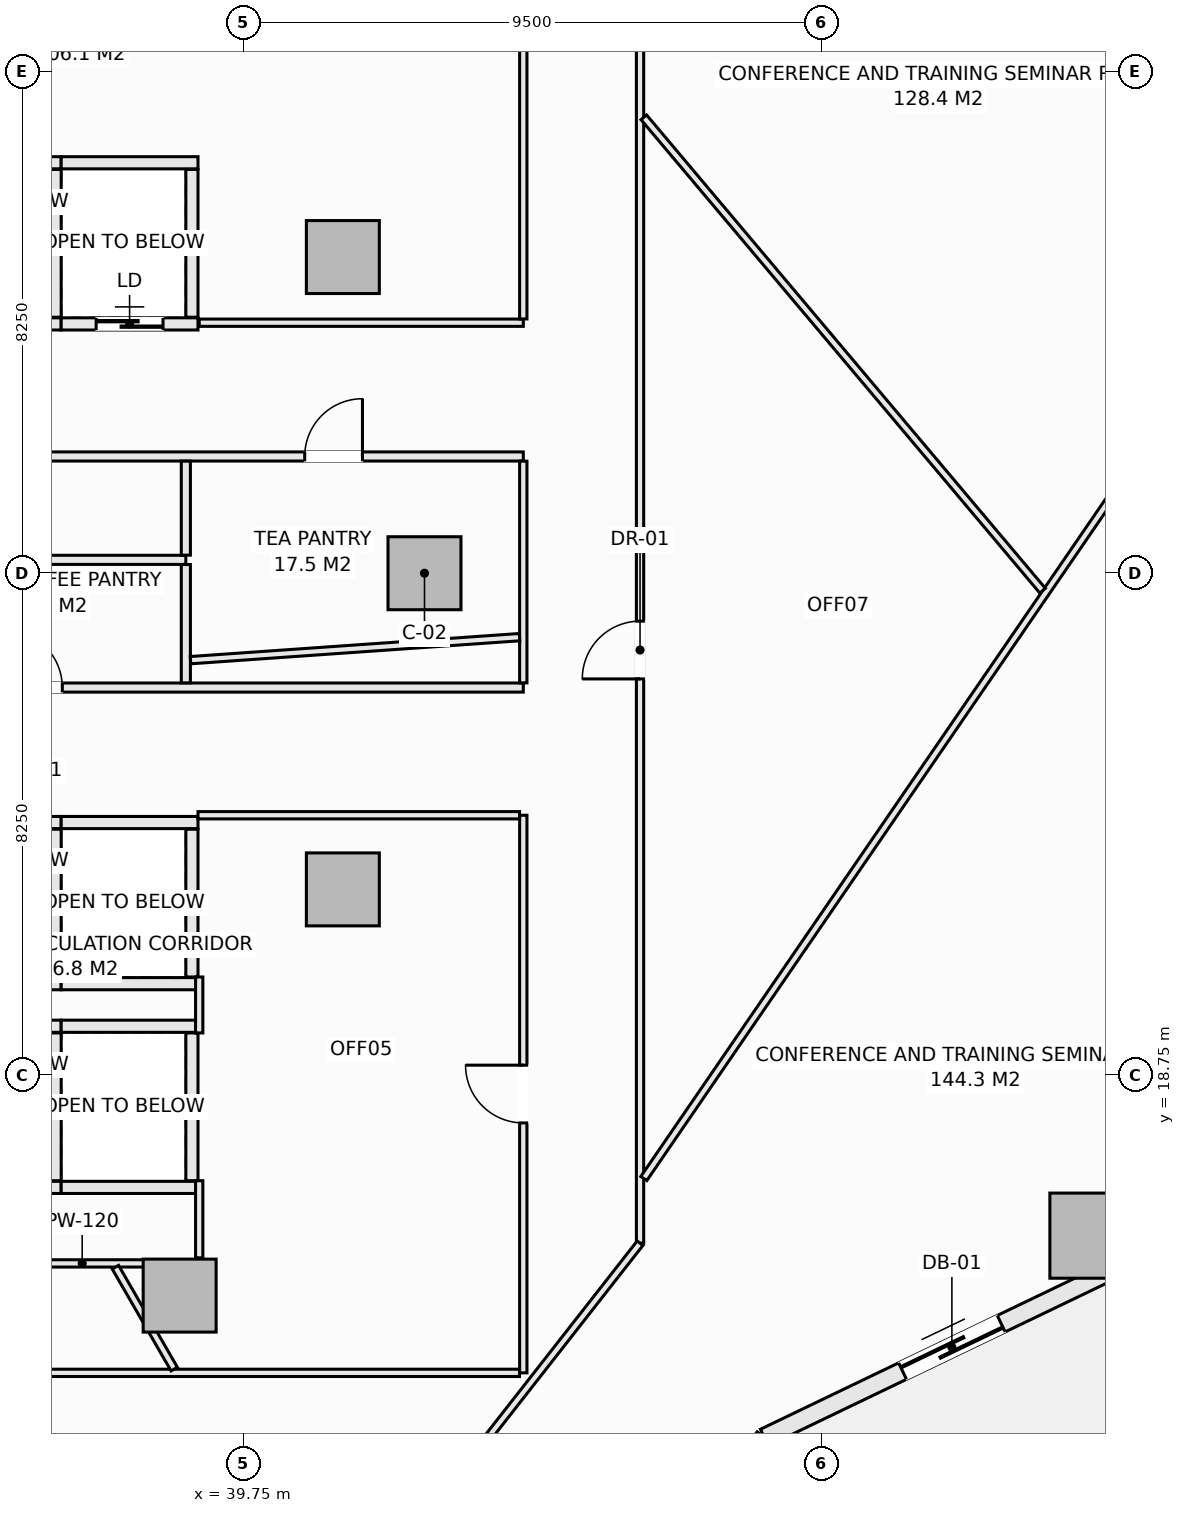
"""IFC4 building model, lengths in metres.
Left out: names, types, materials, properties, quantities, classifications, styles, units other than length and angle.
Written with IfcOpenShell. Run it as: python <this file> out.ifc"""

import sys

from ifc_helpers import new_model, si_unit, direction, frame, frame_2d, origin, origin_2d, place, context, subcontext, project, spatial, rectangle, extrude, element, fill, save


model = new_model("IFC4")
c1 = context("Model", 3, precision=1e-05, world=origin(), true_north=direction((0.0, 1.0)))
c2 = subcontext(c1, "Body", "Model", "MODEL_VIEW")
j1 = project(units=[si_unit("LENGTHUNIT", "METRE"), si_unit("PLANEANGLEUNIT", "RADIAN")], contexts=[c1])
p1 = place(None, origin())
s1 = spatial("IfcSite", under=j1, at=p1, CompositionType="ELEMENT")
p2 = place(p1, origin())
s2 = spatial("IfcBuilding", under=s1, at=p2, CompositionType="ELEMENT")
p3 = place(p2, frame((0.0, 0.0, 38.05)))
s3 = spatial("IfcBuildingStorey", under=s2, at=p3, CompositionType="ELEMENT", Elevation=38.05)
p4 = place(p3, frame((53.71, 16.106, -0.28), z_axis=(0.0, 0.0, 1.0), x_axis=(1.0, 0.0, 0.0)))
e1 = element("IfcColumn", 1, at=p4, inside=s3, PredefinedType="COLUMN", context=c2, shape_type="SweptSolid", body=[
    extrude(rectangle(XDim=1.4, YDim=1.4, at=origin_2d()), origin(), (0.0, 0.0, 1.0), 3.85),
])
for number, where, z_axis, x_axis in (
    (2, (42.725, 27.0, -0.28), (0.0, 0.0, 1.0), (1.0, 0.0, 0.0)),
    (3, (41.382, 32.199, -0.28), (0.0, 0.0, 1.0), (1.0, 0.0, 0.0)),
    (4, (38.698, 15.121, -0.28), (0.0, 0.0, 1.0), (1.0, 0.0, 0.0)),
    (5, (41.382, 21.801, -0.28), (0.0, 0.0, 1.0), (1.0, 0.0, 0.0)),
):
    element("IfcColumn", number, at=place(p3, frame(where, z_axis=z_axis, x_axis=x_axis)), inside=s3, PredefinedType="COLUMN", context=c2, shape_type="SweptSolid", body=[
        extrude(rectangle(XDim=1.2, YDim=1.2, at=origin_2d()), origin(), (0.0, 0.0, 1.0), 3.85),
    ])
p5 = place(p3, frame((44.188, 7.514, 0.0), z_axis=(0.0, 0.0, 1.0), x_axis=(0.616421309777, 0.787416515482, 0.0)))
e6 = element("IfcWall", 6, at=p5, inside=s3, PredefinedType="SOLIDWALL", context=c2, shape_type="SweptSolid", body=[
    extrude(rectangle(XDim=6.696, YDim=0.3, at=frame_2d((3.348, 0.0))), origin(), (0.0, 0.0, 1.0), 3.093),
])
p6 = place(p5, frame((2.148, 0.0, 0.85)))
e7 = element("IfcOpeningElement", 7, at=p6, cuts=e6, PredefinedType="OPENING", context=c2, shape_type="SweptSolid", body=[
    extrude(rectangle(XDim=2.4, YDim=1.9, at=frame_2d((1.2, 0.95))), frame((0.0, 0.16, 0.0), z_axis=(0.0, -1.0, 0.0), x_axis=(1.0, 0.0, 0.0)), (0.0, 0.0, 1.0), 0.32),
])
p7 = place(p3, frame((48.315, 12.787, 0.0), z_axis=(0.0, 0.0, 1.0), x_axis=(0.901360393999, 0.433069786673, 0.0)))
e8 = element("IfcWall", 8, at=p7, inside=s3, PredefinedType="SOLIDWALL", context=c2, shape_type="SweptSolid", body=[
    extrude(rectangle(XDim=6.842, YDim=0.3, at=frame_2d((3.421, 0.0))), origin(), (0.0, 0.0, 1.0), 3.093),
])
p8 = place(p7, frame((2.521, 0.0, 0.0)))
e9 = element("IfcOpeningElement", 9, at=p8, cuts=e8, PredefinedType="OPENING", context=c2, shape_type="SweptSolid", body=[
    extrude(rectangle(XDim=1.8, YDim=2.25, at=frame_2d((0.9, 1.125))), frame((0.0, 0.16, 0.0), z_axis=(0.0, -1.0, 0.0), x_axis=(1.0, 0.0, 0.0)), (0.0, 0.0, 1.0), 0.32),
])
p9 = place(p3, frame((50.959, 10.678, 0.0), z_axis=(0.0, 0.0, 1.0), x_axis=(0.873500119739, 0.48682393205, 0.0)))
e10 = element("IfcWall", 10, at=p9, inside=s3, PredefinedType="PARAPET", context=c2, shape_type="SweptSolid", body=[
    extrude(rectangle(XDim=7.562, YDim=0.22, at=frame_2d((3.781, 0.0))), origin(), (0.0, 0.0, 1.0), 0.52),
])
p10 = place(p3, frame((34.5, 33.75, 0.0), z_axis=(0.0, 0.0, 1.0), x_axis=(1.0, 0.0, 0.0)))
e11 = element("IfcWall", 11, at=p10, inside=s3, PredefinedType="SOLIDWALL", context=c2, shape_type="SweptSolid", body=[
    extrude(rectangle(XDim=2.25, YDim=0.2, at=frame_2d((1.125, 0.0))), origin(), (0.0, 0.0, 1.0), 3.57),
])
p11 = place(p3, frame((34.5, 31.1, 0.0), z_axis=(0.0, 0.0, 1.0), x_axis=(1.0, 0.0, 0.0)))
e12 = element("IfcWall", 12, at=p11, inside=s3, PredefinedType="SOLIDWALL", context=c2, shape_type="SweptSolid", body=[
    extrude(rectangle(XDim=2.25, YDim=0.2, at=frame_2d((1.125, 0.0))), origin(), (0.0, 0.0, 1.0), 3.57),
])
p12 = place(p11, frame((0.575, 0.0, 0.0)))
e13 = element("IfcOpeningElement", 13, at=p12, cuts=e12, PredefinedType="OPENING", context=c2, shape_type="SweptSolid", body=[
    extrude(rectangle(XDim=1.1, YDim=2.2, at=frame_2d((0.55, 1.1))), frame((0.0, 0.11, 0.0), z_axis=(0.0, -1.0, 0.0), x_axis=(1.0, 0.0, 0.0)), (0.0, 0.0, 1.0), 0.22),
])
p13 = place(p3, frame((36.65, 31.21, 0.0), z_axis=(0.0, 0.0, 1.0), x_axis=(0.0, 1.0, 0.0)))
e14 = element("IfcWall", 14, at=p13, inside=s3, PredefinedType="SOLIDWALL", context=c2, shape_type="SweptSolid", body=[
    extrude(rectangle(XDim=2.43, YDim=0.2, at=frame_2d((1.215, 0.0))), origin(), (0.0, 0.0, 1.0), 3.57),
])
p14 = place(p3, frame((36.75, 33.75, 0.0), z_axis=(0.0, 0.0, 1.0), x_axis=(1.0, 0.0, 0.0)))
e15 = element("IfcWall", 15, at=p14, inside=s3, PredefinedType="SOLIDWALL", context=c2, shape_type="SweptSolid", body=[
    extrude(rectangle(XDim=2.25, YDim=0.2, at=frame_2d((1.125, 0.0))), origin(), (0.0, 0.0, 1.0), 3.57),
])
p15 = place(p3, frame((36.75, 31.1, 0.0), z_axis=(0.0, 0.0, 1.0), x_axis=(1.0, 0.0, 0.0)))
e16 = element("IfcWall", 16, at=p15, inside=s3, PredefinedType="SOLIDWALL", context=c2, shape_type="SweptSolid", body=[
    extrude(rectangle(XDim=2.25, YDim=0.2, at=frame_2d((1.125, 0.0))), origin(), (0.0, 0.0, 1.0), 3.57),
])
p16 = place(p15, frame((0.575, 0.0, 0.0)))
e17 = element("IfcOpeningElement", 17, at=p16, cuts=e16, PredefinedType="OPENING", context=c2, shape_type="SweptSolid", body=[
    extrude(rectangle(XDim=1.1, YDim=2.2, at=frame_2d((0.55, 1.1))), frame((0.0, 0.11, 0.0), z_axis=(0.0, -1.0, 0.0), x_axis=(1.0, 0.0, 0.0)), (0.0, 0.0, 1.0), 0.22),
])
p17 = place(p3, frame((38.9, 31.21, 0.0), z_axis=(0.0, 0.0, 1.0), x_axis=(0.0, 1.0, 0.0)))
e18 = element("IfcWall", 18, at=p17, inside=s3, PredefinedType="SOLIDWALL", context=c2, shape_type="SweptSolid", body=[
    extrude(rectangle(XDim=2.43, YDim=0.2, at=frame_2d((1.215, 0.0))), origin(), (0.0, 0.0, 1.0), 3.57),
])
for number, where, z_axis, x_axis in (
    (19, (34.5, 19.55, 0.0), (0.0, 0.0, 1.0), (1.0, 0.0, 0.0)),
    (20, (34.5, 16.9, 0.0), (0.0, 0.0, 1.0), (1.0, 0.0, 0.0)),
):
    element("IfcWall", number, at=place(p3, frame(where, z_axis=z_axis, x_axis=x_axis)), inside=s3, PredefinedType="SOLIDWALL", context=c2, shape_type="SweptSolid", body=[
        extrude(rectangle(XDim=2.25, YDim=0.2, at=frame_2d((1.125, 0.0))), origin(), (0.0, 0.0, 1.0), 3.57),
    ])
p18 = place(p3, frame((36.65, 17.01, 0.0), z_axis=(0.0, 0.0, 1.0), x_axis=(0.0, 1.0, 0.0)))
e21 = element("IfcWall", 21, at=p18, inside=s3, PredefinedType="SOLIDWALL", context=c2, shape_type="SweptSolid", body=[
    extrude(rectangle(XDim=2.43, YDim=0.2, at=frame_2d((1.215, 0.0))), origin(), (0.0, 0.0, 1.0), 3.57),
])
for number, where, z_axis, x_axis in (
    (22, (36.75, 19.55, 0.0), (0.0, 0.0, 1.0), (1.0, 0.0, 0.0)),
    (23, (36.75, 16.9, 0.0), (0.0, 0.0, 1.0), (1.0, 0.0, 0.0)),
):
    element("IfcWall", number, at=place(p3, frame(where, z_axis=z_axis, x_axis=x_axis)), inside=s3, PredefinedType="SOLIDWALL", context=c2, shape_type="SweptSolid", body=[
        extrude(rectangle(XDim=2.25, YDim=0.2, at=frame_2d((1.125, 0.0))), origin(), (0.0, 0.0, 1.0), 3.57),
    ])
p19 = place(p3, frame((38.9, 17.01, 0.0), z_axis=(0.0, 0.0, 1.0), x_axis=(0.0, 1.0, 0.0)))
e24 = element("IfcWall", 24, at=p19, inside=s3, PredefinedType="SOLIDWALL", context=c2, shape_type="SweptSolid", body=[
    extrude(rectangle(XDim=2.43, YDim=0.2, at=frame_2d((1.215, 0.0))), origin(), (0.0, 0.0, 1.0), 3.57),
])
for number, where, z_axis, x_axis in (
    (25, (34.5, 22.9, 0.0), (0.0, 0.0, 1.0), (1.0, 0.0, 0.0)),
    (26, (34.5, 20.25, 0.0), (0.0, 0.0, 1.0), (1.0, 0.0, 0.0)),
):
    element("IfcWall", number, at=place(p3, frame(where, z_axis=z_axis, x_axis=x_axis)), inside=s3, PredefinedType="SOLIDWALL", context=c2, shape_type="SweptSolid", body=[
        extrude(rectangle(XDim=2.25, YDim=0.2, at=frame_2d((1.125, 0.0))), origin(), (0.0, 0.0, 1.0), 3.57),
    ])
p20 = place(p3, frame((36.65, 20.36, 0.0), z_axis=(0.0, 0.0, 1.0), x_axis=(0.0, 1.0, 0.0)))
e27 = element("IfcWall", 27, at=p20, inside=s3, PredefinedType="SOLIDWALL", context=c2, shape_type="SweptSolid", body=[
    extrude(rectangle(XDim=2.43, YDim=0.2, at=frame_2d((1.215, 0.0))), origin(), (0.0, 0.0, 1.0), 3.57),
])
for number, where, z_axis, x_axis in (
    (28, (36.75, 22.9, 0.0), (0.0, 0.0, 1.0), (1.0, 0.0, 0.0)),
    (29, (36.75, 20.25, 0.0), (0.0, 0.0, 1.0), (1.0, 0.0, 0.0)),
):
    element("IfcWall", number, at=place(p3, frame(where, z_axis=z_axis, x_axis=x_axis)), inside=s3, PredefinedType="SOLIDWALL", context=c2, shape_type="SweptSolid", body=[
        extrude(rectangle(XDim=2.25, YDim=0.2, at=frame_2d((1.125, 0.0))), origin(), (0.0, 0.0, 1.0), 3.57),
    ])
p21 = place(p3, frame((38.9, 20.36, 0.0), z_axis=(0.0, 0.0, 1.0), x_axis=(0.0, 1.0, 0.0)))
e30 = element("IfcWall", 30, at=p21, inside=s3, PredefinedType="SOLIDWALL", context=c2, shape_type="SweptSolid", body=[
    extrude(rectangle(XDim=2.43, YDim=0.2, at=frame_2d((1.215, 0.0))), origin(), (0.0, 0.0, 1.0), 3.57),
])
p22 = place(p3, frame((30.077, 28.92, 0.0), z_axis=(0.0, 0.0, 1.0), x_axis=(1.0, 0.0, 0.0)))
e31 = element("IfcWall", 31, at=p22, inside=s3, PredefinedType="PARTITIONING", context=c2, shape_type="SweptSolid", body=[
    extrude(rectangle(XDim=14.273, YDim=0.15, at=frame_2d((7.137, 0.0))), origin(), (0.0, 0.0, 1.0), 3.57),
])
p23 = place(p22, frame((1.342, 0.0, 0.0)))
e32 = element("IfcOpeningElement", 32, at=p23, cuts=e31, PredefinedType="OPENING", context=c2, shape_type="SweptSolid", body=[
    extrude(rectangle(XDim=0.95, YDim=2.1, at=frame_2d((0.475, 1.05))), frame((0.0, 0.085, 0.0), z_axis=(0.0, -1.0, 0.0), x_axis=(1.0, 0.0, 0.0)), (0.0, 0.0, 1.0), 0.17),
])
p24 = place(p22, frame((5.498, 0.0, 0.0)))
e33 = element("IfcOpeningElement", 33, at=p24, cuts=e31, PredefinedType="OPENING", context=c2, shape_type="SweptSolid", body=[
    extrude(rectangle(XDim=0.95, YDim=2.1, at=frame_2d((0.475, 1.05))), frame((0.0, 0.085, 0.0), z_axis=(0.0, -1.0, 0.0), x_axis=(1.0, 0.0, 0.0)), (0.0, 0.0, 1.0), 0.17),
])
p25 = place(p22, frame((10.678, 0.0, 0.0)))
e34 = element("IfcOpeningElement", 34, at=p25, cuts=e31, PredefinedType="OPENING", context=c2, shape_type="SweptSolid", body=[
    extrude(rectangle(XDim=0.95, YDim=2.1, at=frame_2d((0.475, 1.05))), frame((0.0, 0.085, 0.0), z_axis=(0.0, -1.0, 0.0), x_axis=(1.0, 0.0, 0.0)), (0.0, 0.0, 1.0), 0.17),
])
p26 = place(p3, frame((33.377, 25.12, 0.0), z_axis=(0.0, 0.0, 1.0), x_axis=(1.0, 0.0, 0.0)))
e35 = element("IfcWall", 35, at=p26, inside=s3, PredefinedType="PARTITIONING", context=c2, shape_type="SweptSolid", body=[
    extrude(rectangle(XDim=10.973, YDim=0.15, at=frame_2d((5.487, 0.0))), origin(), (0.0, 0.0, 1.0), 3.57),
])
p27 = place(p26, frame((2.441, 0.0, 0.0)))
e36 = element("IfcOpeningElement", 36, at=p27, cuts=e35, PredefinedType="OPENING", context=c2, shape_type="SweptSolid", body=[
    extrude(rectangle(XDim=0.95, YDim=2.1, at=frame_2d((0.475, 1.05))), frame((0.0, 0.085, 0.0), z_axis=(0.0, -1.0, 0.0), x_axis=(1.0, 0.0, 0.0)), (0.0, 0.0, 1.0), 0.17),
])
p28 = place(p3, frame((33.377, 27.22, 0.0), z_axis=(0.0, 0.0, 1.0), x_axis=(1.0, 0.0, 0.0)))
e37 = element("IfcWall", 37, at=p28, inside=s3, PredefinedType="PARTITIONING", context=c2, shape_type="SweptSolid", body=[
    extrude(rectangle(XDim=5.423, YDim=0.15, at=frame_2d((2.711, 0.0))), origin(), (0.0, 0.0, 1.0), 3.57),
])
p29 = place(p3, frame((38.8, 25.197, 0.0), z_axis=(0.0, 0.0, 1.0), x_axis=(0.0, 1.0, 0.0)))
e38 = element("IfcWall", 38, at=p29, inside=s3, PredefinedType="PARTITIONING", context=c2, shape_type="SweptSolid", body=[
    extrude(rectangle(XDim=1.946, YDim=0.15, at=frame_2d((0.973, 0.0))), origin(), (0.0, 0.0, 1.0), 3.57),
])
p30 = place(p3, frame((38.8, 27.297, 0.0), z_axis=(0.0, 0.0, 1.0), x_axis=(0.0, 1.0, 0.0)))
e39 = element("IfcWall", 39, at=p30, inside=s3, PredefinedType="PARTITIONING", context=c2, shape_type="SweptSolid", body=[
    extrude(rectangle(XDim=1.546, YDim=0.15, at=frame_2d((0.773, 0.0))), origin(), (0.0, 0.0, 1.0), 3.57),
])
p31 = place(p3, frame((39.02, 31.12, 0.0), z_axis=(0.0, 0.0, 1.0), x_axis=(1.0, 0.0, 0.0)))
e40 = element("IfcWall", 40, at=p31, inside=s3, PredefinedType="PARTITIONING", context=c2, shape_type="SweptSolid", body=[
    extrude(rectangle(XDim=5.33, YDim=0.12, at=frame_2d((2.665, 0.0))), origin(), (0.0, 0.0, 1.0), 3.57),
])
p32 = place(p3, frame((44.35, 13.85, 0.0), z_axis=(0.0, 0.0, 1.0), x_axis=(0.0, 1.0, 0.0)))
e41 = element("IfcWall", 41, at=p32, inside=s3, PredefinedType="PARTITIONING", context=c2, shape_type="SweptSolid", body=[
    extrude(rectangle(XDim=9.17, YDim=0.12, at=frame_2d((4.585, 0.0))), origin(), (0.0, 0.0, 1.0), 3.57),
])
p33 = place(p32, frame((4.11, 0.0, 0.0)))
e42 = element("IfcOpeningElement", 42, at=p33, cuts=e41, PredefinedType="OPENING", context=c2, shape_type="SweptSolid", body=[
    extrude(rectangle(XDim=0.95, YDim=2.1, at=frame_2d((0.475, 1.05))), frame((0.0, 0.07, 0.0), z_axis=(0.0, -1.0, 0.0), x_axis=(1.0, 0.0, 0.0)), (0.0, 0.0, 1.0), 0.14),
])
p34 = place(p3, frame((44.35, 25.197, 0.0), z_axis=(0.0, 0.0, 1.0), x_axis=(0.0, 1.0, 0.0)))
e43 = element("IfcWall", 43, at=p34, inside=s3, PredefinedType="PARTITIONING", context=c2, shape_type="SweptSolid", body=[
    extrude(rectangle(XDim=3.646, YDim=0.12, at=frame_2d((1.823, 0.0))), origin(), (0.0, 0.0, 1.0), 3.57),
])
p35 = place(p3, frame((44.35, 31.182, 0.0), z_axis=(0.0, 0.0, 1.0), x_axis=(0.0, 1.0, 0.0)))
e44 = element("IfcWall", 44, at=p35, inside=s3, PredefinedType="PARTITIONING", context=c2, shape_type="SweptSolid", body=[
    extrude(rectangle(XDim=8.918, YDim=0.12, at=frame_2d((4.459, 0.0))), origin(), (0.0, 0.0, 1.0), 3.57),
])
p36 = place(p3, frame((46.27, 15.982, 0.0), z_axis=(0.0, 0.0, 1.0), x_axis=(0.0, 1.0, 0.0)))
e45 = element("IfcWall", 45, at=p36, inside=s3, PredefinedType="PARTITIONING", context=c2, shape_type="SweptSolid", body=[
    extrude(rectangle(XDim=22.036, YDim=0.12, at=frame_2d((11.018, 0.0))), origin(), (0.0, 0.0, 1.0), 3.57),
])
p37 = place(p36, frame((9.28, 0.0, 0.0)))
e46 = element("IfcOpeningElement", 46, at=p37, cuts=e45, PredefinedType="OPENING", context=c2, shape_type="SweptSolid", body=[
    extrude(rectangle(XDim=0.95, YDim=2.1, at=frame_2d((0.475, 1.05))), frame((0.0, 0.07, 0.0), z_axis=(0.0, -1.0, 0.0), x_axis=(1.0, 0.0, 0.0)), (0.0, 0.0, 1.0), 0.14),
])
p38 = place(p3, frame((42.957, 11.75, 0.0), z_axis=(0.0, 0.0, 1.0), x_axis=(0.616428289415, 0.78741105149, 0.0)))
e47 = element("IfcWall", 47, at=p38, inside=s3, PredefinedType="PARTITIONING", context=c2, shape_type="SweptSolid", body=[
    extrude(rectangle(XDim=5.375, YDim=0.12, at=frame_2d((2.687, 0.0))), origin(), (0.0, 0.0, 1.0), 3.57),
])
p39 = place(p3, frame((35.95, 13.85, 0.0), z_axis=(0.0, 0.0, 1.0), x_axis=(1.0, 0.0, 0.0)))
e48 = element("IfcWall", 48, at=p39, inside=s3, PredefinedType="PARTITIONING", context=c2, shape_type="SweptSolid", body=[
    extrude(rectangle(XDim=8.338, YDim=0.12, at=frame_2d((4.169, 0.0))), origin(), (0.0, 0.0, 1.0), 3.57),
])
p40 = place(p3, frame((35.95, 15.65, 0.0), z_axis=(0.0, 0.0, 1.0), x_axis=(1.0, 0.0, 0.0)))
e49 = element("IfcWall", 49, at=p40, inside=s3, PredefinedType="PARTITIONING", context=c2, shape_type="SweptSolid", body=[
    extrude(rectangle(XDim=2.291, YDim=0.12, at=frame_2d((1.146, 0.0))), origin(), (0.0, 0.0, 1.0), 3.57),
])
p41 = place(p3, frame((39.0, 23.02, 0.0), z_axis=(0.0, 0.0, 1.0), x_axis=(1.0, 0.0, 0.0)))
e50 = element("IfcWall", 50, at=p41, inside=s3, PredefinedType="PARTITIONING", context=c2, shape_type="SweptSolid", body=[
    extrude(rectangle(XDim=5.288, YDim=0.12, at=frame_2d((2.644, 0.0))), origin(), (0.0, 0.0, 1.0), 3.57),
])
p42 = place(p3, frame((39.02, 15.742, 0.0), z_axis=(0.0, 0.0, 1.0), x_axis=(0.0, 1.0, 0.0)))
e51 = element("IfcWall", 51, at=p42, inside=s3, PredefinedType="PARTITIONING", context=c2, shape_type="SweptSolid", body=[
    extrude(rectangle(XDim=1.268, YDim=0.12, at=frame_2d((0.634, 0.0))), origin(), (0.0, 0.0, 1.0), 2.934),
])
p43 = place(p3, frame((39.02, 19.44, 0.0), z_axis=(0.0, 0.0, 1.0), x_axis=(0.0, 1.0, 0.0)))
e52 = element("IfcWall", 52, at=p43, inside=s3, PredefinedType="PARTITIONING", context=c2, shape_type="SweptSolid", body=[
    extrude(rectangle(XDim=0.92, YDim=0.12, at=frame_2d((0.46, 0.0))), origin(), (0.0, 0.0, 1.0), 3.57),
])
p44 = place(p3, frame((46.332, 17.045, 0.0), z_axis=(0.0, 0.0, 1.0), x_axis=(0.565716902062, 0.824599531119, 0.0)))
e53 = element("IfcWall", 53, at=p44, inside=s3, PredefinedType="PARTITIONING", context=c2, shape_type="SweptSolid", body=[
    extrude(rectangle(XDim=19.098, YDim=0.12, at=frame_2d((9.549, 0.0))), origin(), (0.0, 0.0, 1.0), 3.57),
])
p45 = place(p3, frame((37.642, 15.588, 0.0), z_axis=(0.0, 0.0, 1.0), x_axis=(0.499911776505, -0.866076333652, 0.0)))
e54 = element("IfcWall", 54, at=p45, inside=s3, PredefinedType="PARTITIONING", context=c2, shape_type="SweptSolid", body=[
    extrude(rectangle(XDim=1.935, YDim=0.12, at=frame_2d((0.967, 0.0))), origin(), (0.0, 0.0, 1.0), 3.57),
])
p46 = place(p3, frame((46.332, 34.497, 0.0), z_axis=(0.0, 0.0, 1.0), x_axis=(0.644329997074, -0.764747575917, 0.0)))
e55 = element("IfcWall", 55, at=p46, inside=s3, PredefinedType="PARTITIONING", context=c2, shape_type="SweptSolid", body=[
    extrude(rectangle(XDim=10.178, YDim=0.12, at=frame_2d((5.089, 0.0))), origin(), (0.0, 0.0, 1.0), 3.57),
])
p47 = place(p3, frame((38.877, 25.57, 0.0), z_axis=(0.0, 0.0, 1.0), x_axis=(0.997563605061, 0.069762840094, 0.0)))
e56 = element("IfcWall", 56, at=p47, inside=s3, PredefinedType="PARTITIONING", context=c2, shape_type="SweptSolid", body=[
    extrude(rectangle(XDim=5.424, YDim=0.12, at=frame_2d((2.712, 0.0))), origin(), (0.0, 0.0, 1.0), 3.57),
])
p48 = place(p8, frame((1.8, 0.0, 0.0), z_axis=(0.0, 0.0, 1.0), x_axis=(-1.0, 0.0, 0.0)))
e57 = element("IfcDoor", 57, at=p48, inside=s3, OperationType="SLIDING_TO_LEFT", PredefinedType="DOOR", context=c2, shape_type="SweptSolid", body=[
    extrude(rectangle(XDim=1.8, YDim=2.25, at=frame_2d((0.9, 1.125))), frame((0.0, 0.025, 0.0), z_axis=(0.0, -1.0, 0.0), x_axis=(1.0, 0.0, 0.0)), (0.0, 0.0, 1.0), 0.05),
])
fill(e9, e57)
p49 = place(p16, origin())
e58 = element("IfcDoor", 58, at=p49, inside=s3, OperationType="SLIDING_TO_LEFT", PredefinedType="DOOR", context=c2, shape_type="SweptSolid", body=[
    extrude(rectangle(XDim=1.1, YDim=2.2, at=frame_2d((0.55, 1.1))), frame((0.0, 0.025, 0.0), z_axis=(0.0, -1.0, 0.0), x_axis=(1.0, 0.0, 0.0)), (0.0, 0.0, 1.0), 0.05),
])
fill(e17, e58)
p50 = place(p27, origin())
e59 = element("IfcDoor", 59, at=p50, inside=s3, OperationType="SINGLE_SWING_LEFT", PredefinedType="DOOR", context=c2, shape_type="SweptSolid", body=[
    extrude(rectangle(XDim=0.95, YDim=2.1, at=frame_2d((0.475, 1.05))), frame((0.0, 0.025, 0.0), z_axis=(0.0, -1.0, 0.0), x_axis=(1.0, 0.0, 0.0)), (0.0, 0.0, 1.0), 0.05),
])
fill(e36, e59)
p51 = place(p33, origin())
e60 = element("IfcDoor", 60, at=p51, inside=s3, OperationType="SINGLE_SWING_RIGHT", PredefinedType="DOOR", context=c2, shape_type="SweptSolid", body=[
    extrude(rectangle(XDim=0.95, YDim=2.1, at=frame_2d((0.475, 1.05))), frame((0.0, 0.025, 0.0), z_axis=(0.0, -1.0, 0.0), x_axis=(1.0, 0.0, 0.0)), (0.0, 0.0, 1.0), 0.05),
])
fill(e42, e60)
p52 = place(p37, origin())
e61 = element("IfcDoor", 61, at=p52, inside=s3, OperationType="SINGLE_SWING_LEFT", PredefinedType="DOOR", context=c2, shape_type="SweptSolid", body=[
    extrude(rectangle(XDim=0.95, YDim=2.1, at=frame_2d((0.475, 1.05))), frame((0.0, 0.025, 0.0), z_axis=(0.0, -1.0, 0.0), x_axis=(1.0, 0.0, 0.0)), (0.0, 0.0, 1.0), 0.05),
])
fill(e46, e61)
p53 = place(p25, origin())
e62 = element("IfcDoor", 62, at=p53, inside=s3, OperationType="SINGLE_SWING_RIGHT", PredefinedType="DOOR", context=c2, shape_type="SweptSolid", body=[
    extrude(rectangle(XDim=0.95, YDim=2.1, at=frame_2d((0.475, 1.05))), frame((0.0, 0.025, 0.0), z_axis=(0.0, -1.0, 0.0), x_axis=(1.0, 0.0, 0.0)), (0.0, 0.0, 1.0), 0.05),
])
fill(e34, e62)
save(model, sys.argv[1])
